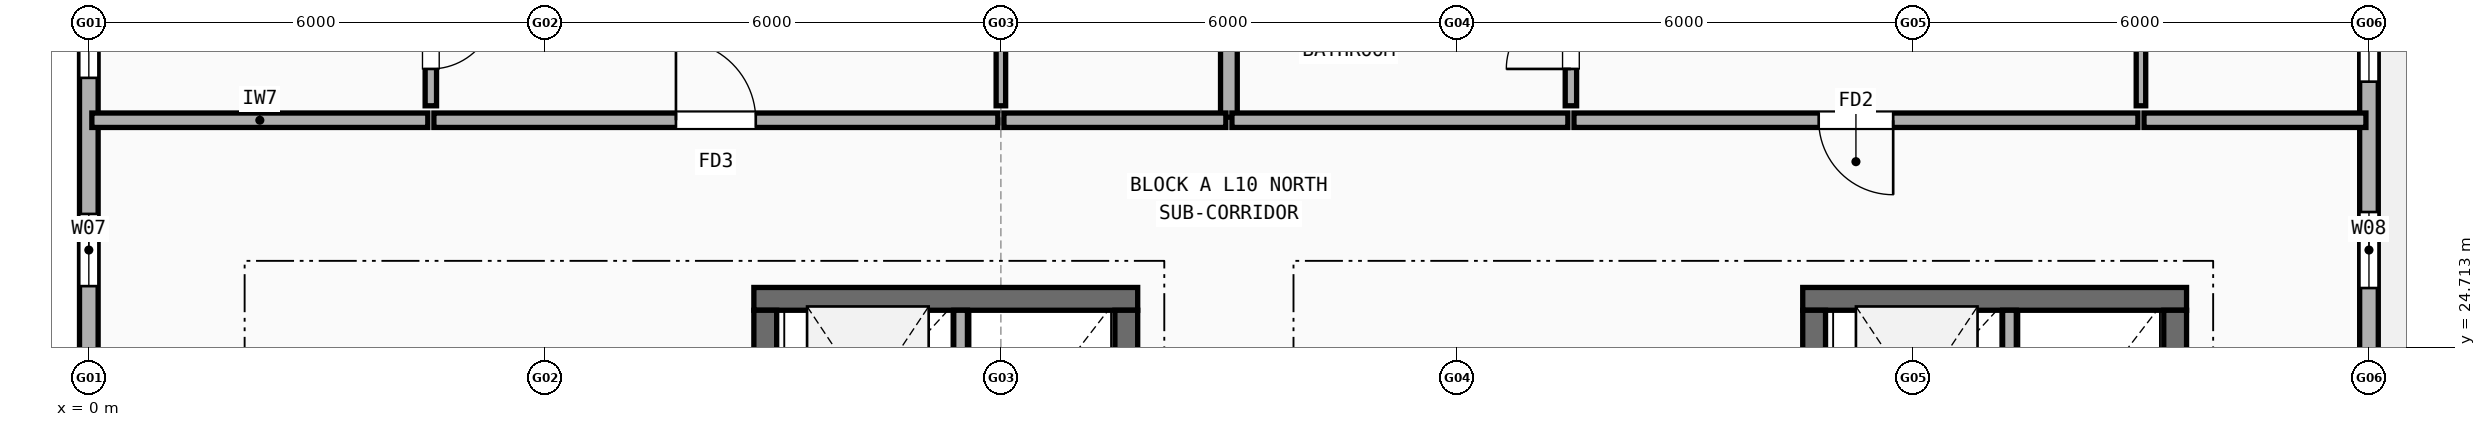
"""IFC4 building model, lengths in metres.
Left out: names, types, materials, properties, quantities, classifications, styles, units other than length and angle.
Written with IfcOpenShell. Run it as: python <this file> out.ifc"""

import sys

from ifc_helpers import new_model, si_unit, direction, frame, frame_2d, origin, place, context, subcontext, project, spatial, rectangle, extrude, element, fill, save


model = new_model("IFC4")
c1 = context("Model", 3, precision=1e-05, world=origin(), true_north=direction((0.0, 1.0)))
c2 = subcontext(c1, "Body", "Model", "MODEL_VIEW")
j1 = project(units=[si_unit("LENGTHUNIT", "METRE"), si_unit("PLANEANGLEUNIT", "RADIAN")], contexts=[c1])
p1 = place(None, origin())
s1 = spatial("IfcSite", under=j1, at=p1, CompositionType="ELEMENT")
p2 = place(p1, origin())
s2 = spatial("IfcBuilding", under=s1, at=p2, CompositionType="ELEMENT")
p3 = place(p2, frame((0.0, 0.0, 33.3)))
s3 = spatial("IfcBuildingStorey", under=s2, at=p3, CompositionType="ELEMENT", Elevation=33.3)
p4 = place(p3, frame((30.0, 24.325, 0.0), z_axis=(0.0, 0.0, 1.0), x_axis=(0.0, 1.0, 0.0)))
e1 = element("IfcWall", 1, at=p4, inside=s3, PredefinedType="STANDARD", context=c2, shape_type="SweptSolid", body=[
    extrude(rectangle(XDim=5.35, YDim=0.245, at=frame_2d((2.675, 0.0))), origin(), (0.0, 0.0, 1.0), 2.472),
])
p5 = place(p4, frame((1.167, 0.0, 0.9)))
e2 = element("IfcOpeningElement", 2, at=p5, cuts=e1, PredefinedType="OPENING", context=c2, shape_type="SweptSolid", body=[
    extrude(rectangle(XDim=1.0, YDim=1.4, at=frame_2d((0.5, 0.7))), frame((0.0, 0.133, 0.0), z_axis=(0.0, -1.0, 0.0), x_axis=(1.0, 0.0, 0.0)), (0.0, 0.0, 1.0), 0.265),
])
p6 = place(p4, frame((3.883, 0.0, 0.9)))
e3 = element("IfcOpeningElement", 3, at=p6, cuts=e1, PredefinedType="OPENING", context=c2, shape_type="SweptSolid", body=[
    extrude(rectangle(XDim=1.0, YDim=1.4, at=frame_2d((0.5, 0.7))), frame((0.0, 0.133, 0.0), z_axis=(0.0, -1.0, 0.0), x_axis=(1.0, 0.0, 0.0)), (0.0, 0.0, 1.0), 0.265),
])
p7 = place(p3, frame((0.0, 29.675, 0.0), z_axis=(0.0, 0.0, 1.0), x_axis=(0.0, -1.0, 0.0)))
e4 = element("IfcWall", 4, at=p7, inside=s3, PredefinedType="STANDARD", context=c2, shape_type="SweptSolid", body=[
    extrude(rectangle(XDim=5.35, YDim=0.245, at=frame_2d((2.675, 0.0))), origin(), (0.0, 0.0, 1.0), 2.472),
])
p8 = place(p7, frame((0.518, 0.0, 0.9)))
e5 = element("IfcOpeningElement", 5, at=p8, cuts=e4, PredefinedType="OPENING", context=c2, shape_type="SweptSolid", body=[
    extrude(rectangle(XDim=0.9, YDim=1.3, at=frame_2d((0.45, 0.65))), frame((0.0, 0.133, 0.0), z_axis=(0.0, -1.0, 0.0), x_axis=(1.0, 0.0, 0.0)), (0.0, 0.0, 1.0), 0.265),
])
p9 = place(p7, frame((3.208, 0.0, 0.9)))
e6 = element("IfcOpeningElement", 6, at=p9, cuts=e4, PredefinedType="OPENING", context=c2, shape_type="SweptSolid", body=[
    extrude(rectangle(XDim=0.95, YDim=1.35, at=frame_2d((0.475, 0.675))), frame((0.0, 0.133, 0.0), z_axis=(0.0, -1.0, 0.0), x_axis=(1.0, 0.0, 0.0)), (0.0, 0.0, 1.0), 0.265),
])
p10 = place(p3, frame((13.8, 25.35, 0.0), z_axis=(0.0, 0.0, 1.0), x_axis=(-1.0, 0.0, 0.0)))
e7 = element("IfcWall", 7, at=p10, inside=s3, PredefinedType="SHEAR", context=c2, shape_type="SweptSolid", body=[
    extrude(rectangle(XDim=5.05, YDim=0.3, at=frame_2d((2.525, 0.0))), origin(), (0.0, 0.0, 1.0), 2.99),
])
p11 = place(p3, frame((13.65, 18.75, 0.0), z_axis=(0.0, 0.0, 1.0), x_axis=(0.0, 1.0, 0.0)))
e8 = element("IfcWall", 8, at=p11, inside=s3, PredefinedType="SHEAR", context=c2, shape_type="SweptSolid", body=[
    extrude(rectangle(XDim=6.45, YDim=0.3, at=frame_2d((3.225, 0.0))), origin(), (0.0, 0.0, 1.0), 2.99),
])
p12 = place(p3, frame((8.9, 21.75, 0.0), z_axis=(0.0, 0.0, 1.0), x_axis=(0.0, 1.0, 0.0)))
e9 = element("IfcWall", 9, at=p12, inside=s3, PredefinedType="SHEAR", context=c2, shape_type="SweptSolid", body=[
    extrude(rectangle(XDim=3.45, YDim=0.3, at=frame_2d((1.725, 0.0))), origin(), (0.0, 0.0, 1.0), 2.99),
])
p13 = place(p3, frame((11.47, 22.94, 0.0), z_axis=(0.0, 0.0, 1.0), x_axis=(0.0, 1.0, 0.0)))
e10 = element("IfcWall", 10, at=p13, inside=s3, PredefinedType="SOLIDWALL", context=c2, shape_type="SweptSolid", body=[
    extrude(rectangle(XDim=2.26, YDim=0.18, at=frame_2d((1.13, 0.0))), origin(), (0.0, 0.0, 1.0), 2.99),
])
p14 = place(p3, frame((27.6, 25.35, 0.0), z_axis=(0.0, 0.0, 1.0), x_axis=(-1.0, 0.0, 0.0)))
e11 = element("IfcWall", 11, at=p14, inside=s3, PredefinedType="SHEAR", context=c2, shape_type="SweptSolid", body=[
    extrude(rectangle(XDim=5.05, YDim=0.3, at=frame_2d((2.525, 0.0))), origin(), (0.0, 0.0, 1.0), 2.99),
])
p15 = place(p3, frame((27.45, 18.75, 0.0), z_axis=(0.0, 0.0, 1.0), x_axis=(0.0, 1.0, 0.0)))
e12 = element("IfcWall", 12, at=p15, inside=s3, PredefinedType="SHEAR", context=c2, shape_type="SweptSolid", body=[
    extrude(rectangle(XDim=6.45, YDim=0.3, at=frame_2d((3.225, 0.0))), origin(), (0.0, 0.0, 1.0), 2.99),
])
p16 = place(p3, frame((22.7, 21.75, 0.0), z_axis=(0.0, 0.0, 1.0), x_axis=(0.0, 1.0, 0.0)))
e13 = element("IfcWall", 13, at=p16, inside=s3, PredefinedType="SHEAR", context=c2, shape_type="SweptSolid", body=[
    extrude(rectangle(XDim=3.45, YDim=0.3, at=frame_2d((1.725, 0.0))), origin(), (0.0, 0.0, 1.0), 2.99),
])
p17 = place(p3, frame((25.27, 22.94, 0.0), z_axis=(0.0, 0.0, 1.0), x_axis=(0.0, 1.0, 0.0)))
e14 = element("IfcWall", 14, at=p17, inside=s3, PredefinedType="SOLIDWALL", context=c2, shape_type="SweptSolid", body=[
    extrude(rectangle(XDim=2.26, YDim=0.18, at=frame_2d((1.13, 0.0))), origin(), (0.0, 0.0, 1.0), 2.99),
])
p18 = place(p3, frame((15.0, 27.74, 0.0), z_axis=(0.0, 0.0, 1.0), x_axis=(0.0, 1.0, 0.0)))
e15 = element("IfcWall", 15, at=p18, inside=s3, PredefinedType="SOLIDWALL", context=c2, shape_type="SweptSolid", body=[
    extrude(rectangle(XDim=7.87, YDim=0.22, at=frame_2d((3.935, 0.0))), origin(), (0.0, 0.0, 1.0), 2.472),
])
p19 = place(p3, frame((0.04, 27.7, 0.0), z_axis=(0.0, 0.0, 1.0), x_axis=(1.0, 0.0, 0.0)))
e16 = element("IfcWall", 16, at=p19, inside=s3, PredefinedType="SOLIDWALL", context=c2, shape_type="SweptSolid", body=[
    extrude(rectangle(XDim=4.42, YDim=0.19, at=frame_2d((2.21, 0.0))), origin(), (0.0, 0.0, 1.0), 2.472),
])
p20 = place(p3, frame((4.54, 27.7, 0.0), z_axis=(0.0, 0.0, 1.0), x_axis=(1.0, 0.0, 0.0)))
e17 = element("IfcWall", 17, at=p20, inside=s3, PredefinedType="SOLIDWALL", context=c2, shape_type="SweptSolid", body=[
    extrude(rectangle(XDim=7.42, YDim=0.19, at=frame_2d((3.71, 0.0))), origin(), (0.0, 0.0, 1.0), 2.508),
])
p21 = place(p20, frame((3.185, 0.0, 0.0)))
e18 = element("IfcOpeningElement", 18, at=p21, cuts=e17, PredefinedType="OPENING", context=c2, shape_type="SweptSolid", body=[
    extrude(rectangle(XDim=1.05, YDim=2.15, at=frame_2d((0.525, 1.075))), frame((0.0, 0.105, 0.0), z_axis=(0.0, -1.0, 0.0), x_axis=(1.0, 0.0, 0.0)), (0.0, 0.0, 1.0), 0.21),
])
p22 = place(p3, frame((4.5, 27.89, 0.0), z_axis=(0.0, 0.0, 1.0), x_axis=(0.0, 1.0, 0.0)))
e19 = element("IfcWall", 19, at=p22, inside=s3, PredefinedType="PARTITIONING", context=c2, shape_type="SweptSolid", body=[
    extrude(rectangle(XDim=1.82, YDim=0.15, at=frame_2d((0.91, 0.0))), origin(), (0.0, 0.0, 1.0), 2.99),
])
p23 = place(p22, frame((0.485, 0.0, 0.0)))
e20 = element("IfcOpeningElement", 20, at=p23, cuts=e19, PredefinedType="OPENING", context=c2, shape_type="SweptSolid", body=[
    extrude(rectangle(XDim=0.85, YDim=2.1, at=frame_2d((0.425, 1.05))), frame((0.0, 0.085, 0.0), z_axis=(0.0, -1.0, 0.0), x_axis=(1.0, 0.0, 0.0)), (0.0, 0.0, 1.0), 0.17),
])
p24 = place(p3, frame((12.04, 27.7, 0.0), z_axis=(0.0, 0.0, 1.0), x_axis=(1.0, 0.0, 0.0)))
e21 = element("IfcWall", 21, at=p24, inside=s3, PredefinedType="SOLIDWALL", context=c2, shape_type="SweptSolid", body=[
    extrude(rectangle(XDim=2.92, YDim=0.19, at=frame_2d((1.46, 0.0))), origin(), (0.0, 0.0, 1.0), 2.508),
])
p25 = place(p3, frame((12.0, 27.89, 0.0), z_axis=(0.0, 0.0, 1.0), x_axis=(0.0, 1.0, 0.0)))
e22 = element("IfcWall", 22, at=p25, inside=s3, PredefinedType="PARTITIONING", context=c2, shape_type="SweptSolid", body=[
    extrude(rectangle(XDim=7.6, YDim=0.125, at=frame_2d((3.8, 0.0))), origin(), (0.0, 0.0, 1.0), 2.458),
])
p26 = place(p25, frame((3.65, 0.0, 0.0)))
e23 = element("IfcOpeningElement", 23, at=p26, cuts=e22, PredefinedType="OPENING", context=c2, shape_type="SweptSolid", body=[
    extrude(rectangle(XDim=0.88, YDim=2.1, at=frame_2d((0.44, 1.05))), frame((0.0, 0.073, 0.0), z_axis=(0.0, -1.0, 0.0), x_axis=(1.0, 0.0, 0.0)), (0.0, 0.0, 1.0), 0.145),
])
p27 = place(p3, frame((15.04, 27.7, 0.0), z_axis=(0.0, 0.0, 1.0), x_axis=(1.0, 0.0, 0.0)))
e24 = element("IfcWall", 24, at=p27, inside=s3, PredefinedType="SOLIDWALL", context=c2, shape_type="SweptSolid", body=[
    extrude(rectangle(XDim=4.42, YDim=0.19, at=frame_2d((2.21, 0.0))), origin(), (0.0, 0.0, 1.0), 2.99),
])
p28 = place(p3, frame((19.54, 27.7, 0.0), z_axis=(0.0, 0.0, 1.0), x_axis=(1.0, 0.0, 0.0)))
e25 = element("IfcWall", 25, at=p28, inside=s3, PredefinedType="SOLIDWALL", context=c2, shape_type="SweptSolid", body=[
    extrude(rectangle(XDim=7.42, YDim=0.19, at=frame_2d((3.71, 0.0))), origin(), (0.0, 0.0, 1.0), 2.99),
])
p29 = place(p28, frame((3.22, 0.0, 0.0)))
e26 = element("IfcOpeningElement", 26, at=p29, cuts=e25, PredefinedType="OPENING", context=c2, shape_type="SweptSolid", body=[
    extrude(rectangle(XDim=0.98, YDim=2.15, at=frame_2d((0.49, 1.075))), frame((0.0, 0.105, 0.0), z_axis=(0.0, -1.0, 0.0), x_axis=(1.0, 0.0, 0.0)), (0.0, 0.0, 1.0), 0.21),
])
p30 = place(p3, frame((19.5, 27.89, 0.0), z_axis=(0.0, 0.0, 1.0), x_axis=(0.0, 1.0, 0.0)))
e27 = element("IfcWall", 27, at=p30, inside=s3, PredefinedType="PARTITIONING", context=c2, shape_type="SweptSolid", body=[
    extrude(rectangle(XDim=1.82, YDim=0.15, at=frame_2d((0.91, 0.0))), origin(), (0.0, 0.0, 1.0), 2.99),
])
p31 = place(p30, frame((0.485, 0.0, 0.0)))
e28 = element("IfcOpeningElement", 28, at=p31, cuts=e27, PredefinedType="OPENING", context=c2, shape_type="SweptSolid", body=[
    extrude(rectangle(XDim=0.85, YDim=2.1, at=frame_2d((0.425, 1.05))), frame((0.0, 0.085, 0.0), z_axis=(0.0, -1.0, 0.0), x_axis=(1.0, 0.0, 0.0)), (0.0, 0.0, 1.0), 0.17),
])
p32 = place(p3, frame((27.04, 27.7, 0.0), z_axis=(0.0, 0.0, 1.0), x_axis=(1.0, 0.0, 0.0)))
e29 = element("IfcWall", 29, at=p32, inside=s3, PredefinedType="SOLIDWALL", context=c2, shape_type="SweptSolid", body=[
    extrude(rectangle(XDim=2.92, YDim=0.19, at=frame_2d((1.46, 0.0))), origin(), (0.0, 0.0, 1.0), 2.472),
])
p33 = place(p3, frame((27.0, 27.89, 0.0), z_axis=(0.0, 0.0, 1.0), x_axis=(0.0, 1.0, 0.0)))
e30 = element("IfcWall", 30, at=p33, inside=s3, PredefinedType="PARTITIONING", context=c2, shape_type="SweptSolid", body=[
    extrude(rectangle(XDim=7.92, YDim=0.125, at=frame_2d((3.96, 0.0))), origin(), (0.0, 0.0, 1.0), 2.472),
])
p34 = place(p33, frame((3.65, 0.0, 0.0)))
e31 = element("IfcOpeningElement", 31, at=p34, cuts=e30, PredefinedType="OPENING", context=c2, shape_type="SweptSolid", body=[
    extrude(rectangle(XDim=0.9, YDim=2.1, at=frame_2d((0.45, 1.05))), frame((0.0, 0.073, 0.0), z_axis=(0.0, -1.0, 0.0), x_axis=(1.0, 0.0, 0.0)), (0.0, 0.0, 1.0), 0.145),
])
p35 = place(p5, origin())
e32 = element("IfcWindow", 32, at=p35, inside=s3, PartitioningType="SINGLE_PANEL", PredefinedType="WINDOW", context=c2, shape_type="SweptSolid", body=[
    extrude(rectangle(XDim=1.0, YDim=1.4, at=frame_2d((0.5, 0.7))), frame((0.0, 0.03, 0.0), z_axis=(0.0, -1.0, 0.0), x_axis=(1.0, 0.0, 0.0)), (0.0, 0.0, 1.0), 0.06),
])
fill(e2, e32)
p36 = place(p6, origin())
e33 = element("IfcWindow", 33, at=p36, inside=s3, PartitioningType="SINGLE_PANEL", PredefinedType="WINDOW", context=c2, shape_type="SweptSolid", body=[
    extrude(rectangle(XDim=1.0, YDim=1.4, at=frame_2d((0.5, 0.7))), frame((0.0, 0.03, 0.0), z_axis=(0.0, -1.0, 0.0), x_axis=(1.0, 0.0, 0.0)), (0.0, 0.0, 1.0), 0.06),
])
fill(e3, e33)
p37 = place(p8, origin())
e34 = element("IfcWindow", 34, at=p37, inside=s3, PartitioningType="SINGLE_PANEL", PredefinedType="WINDOW", context=c2, shape_type="SweptSolid", body=[
    extrude(rectangle(XDim=0.9, YDim=1.3, at=frame_2d((0.45, 0.65))), frame((0.0, 0.03, 0.0), z_axis=(0.0, -1.0, 0.0), x_axis=(1.0, 0.0, 0.0)), (0.0, 0.0, 1.0), 0.06),
])
fill(e5, e34)
p38 = place(p9, origin())
e35 = element("IfcWindow", 35, at=p38, inside=s3, PartitioningType="SINGLE_PANEL", PredefinedType="WINDOW", context=c2, shape_type="SweptSolid", body=[
    extrude(rectangle(XDim=0.95, YDim=1.35, at=frame_2d((0.475, 0.675))), frame((0.0, 0.03, 0.0), z_axis=(0.0, -1.0, 0.0), x_axis=(1.0, 0.0, 0.0)), (0.0, 0.0, 1.0), 0.06),
])
fill(e6, e35)
p39 = place(p21, origin())
e36 = element("IfcDoor", 36, at=p39, inside=s3, OperationType="SINGLE_SWING_LEFT", PredefinedType="DOOR", context=c2, shape_type="SweptSolid", body=[
    extrude(rectangle(XDim=1.05, YDim=2.15, at=frame_2d((0.525, 1.075))), frame((0.0, 0.025, 0.0), z_axis=(0.0, -1.0, 0.0), x_axis=(1.0, 0.0, 0.0)), (0.0, 0.0, 1.0), 0.05),
])
fill(e18, e36)
p40 = place(p23, origin())
e37 = element("IfcDoor", 37, at=p40, inside=s3, OperationType="SINGLE_SWING_RIGHT", PredefinedType="DOOR", context=c2, shape_type="SweptSolid", body=[
    extrude(rectangle(XDim=0.85, YDim=2.1, at=frame_2d((0.425, 1.05))), frame((0.0, 0.025, 0.0), z_axis=(0.0, -1.0, 0.0), x_axis=(1.0, 0.0, 0.0)), (0.0, 0.0, 1.0), 0.05),
])
fill(e20, e37)
p41 = place(p29, origin())
e38 = element("IfcDoor", 38, at=p41, inside=s3, OperationType="SINGLE_SWING_RIGHT", PredefinedType="DOOR", context=c2, shape_type="SweptSolid", body=[
    extrude(rectangle(XDim=0.98, YDim=2.15, at=frame_2d((0.49, 1.075))), frame((0.0, 0.025, 0.0), z_axis=(0.0, -1.0, 0.0), x_axis=(1.0, 0.0, 0.0)), (0.0, 0.0, 1.0), 0.05),
])
fill(e26, e38)
p42 = place(p31, origin())
e39 = element("IfcDoor", 39, at=p42, inside=s3, OperationType="SINGLE_SWING_LEFT", PredefinedType="DOOR", context=c2, shape_type="SweptSolid", body=[
    extrude(rectangle(XDim=0.85, YDim=2.1, at=frame_2d((0.425, 1.05))), frame((0.0, 0.025, 0.0), z_axis=(0.0, -1.0, 0.0), x_axis=(1.0, 0.0, 0.0)), (0.0, 0.0, 1.0), 0.05),
])
fill(e28, e39)
save(model, sys.argv[1])
